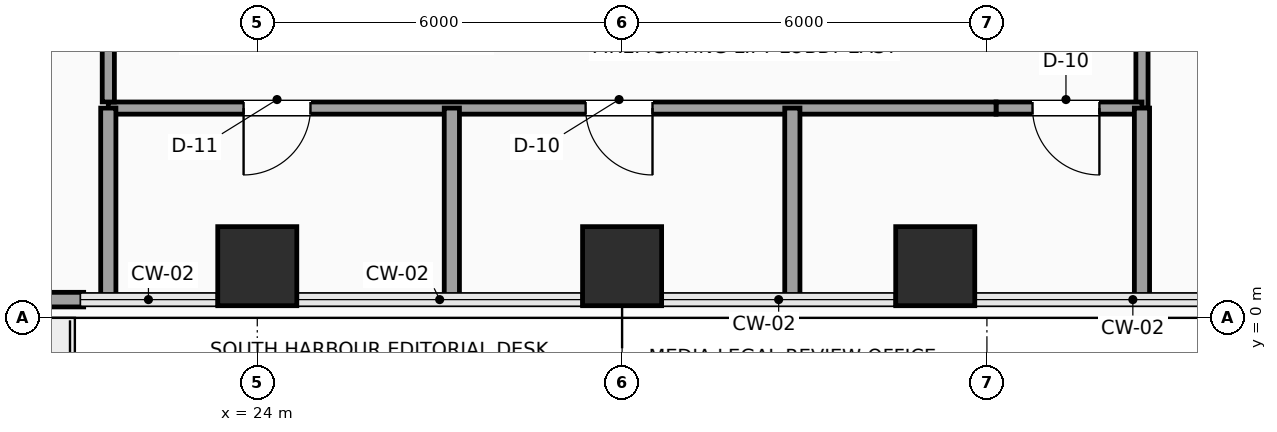
"""IFC4 building model, lengths in metres.
Left out: names, types, materials, properties, quantities, classifications, styles, units other than length and angle.
Written with IfcOpenShell. Run it as: python <this file> out.ifc"""

import sys

from ifc_helpers import new_model, si_unit, direction, frame, frame_2d, origin, origin_2d, place, context, subcontext, project, spatial, rectangle, extrude, element, fill, save


model = new_model("IFC4")
c1 = context("Model", 3, precision=1e-05, world=origin(), true_north=direction((0.0, 1.0)))
c2 = subcontext(c1, "Body", "Model", "MODEL_VIEW")
j1 = project(units=[si_unit("LENGTHUNIT", "METRE"), si_unit("PLANEANGLEUNIT", "RADIAN")], contexts=[c1])
p1 = place(None, origin())
s1 = spatial("IfcSite", under=j1, at=p1, CompositionType="ELEMENT")
p2 = place(p1, origin())
s2 = spatial("IfcBuilding", under=s1, at=p2, CompositionType="ELEMENT")
p3 = place(p2, frame((0.0, 0.0, 79.2)))
s3 = spatial("IfcBuildingStorey", under=s2, at=p3, CompositionType="ELEMENT", Elevation=79.2)
for number, where, z_axis, x_axis in (
    (1, (24.0, 0.85, 0.0), (0.0, 0.0, 1.0), (1.0, 0.0, 0.0)),
    (2, (30.0, 0.85, 0.0), (0.0, 0.0, 1.0), (1.0, 0.0, 0.0)),
    (3, (35.15, 0.85, 0.0), (0.0, 0.0, 1.0), (1.0, 0.0, 0.0)),
):
    element("IfcColumn", number, at=place(p3, frame(where, z_axis=z_axis, x_axis=x_axis)), inside=s3, PredefinedType="COLUMN", context=c2, shape_type="SweptSolid", body=[
        extrude(rectangle(XDim=1.3, YDim=1.3, at=origin_2d()), origin(), (0.0, 0.0, 1.0), 3.9),
    ])
p4 = place(p3, frame((21.145, 0.3, 0.0), z_axis=(0.0, 0.0, 1.0), x_axis=(-1.0, 0.0, 0.0)))
e4 = element("IfcWall", 4, at=p4, inside=s3, PredefinedType="SOLIDWALL", context=c2, shape_type="SweptSolid", body=[
    extrude(rectangle(XDim=9.29, YDim=0.24, at=frame_2d((4.645, 0.0))), origin(), (0.0, 0.0, 1.0), 3.65),
])
p5 = place(p4, frame((3.945, 0.0, 0.0)))
e5 = element("IfcOpeningElement", 5, at=p5, cuts=e4, PredefinedType="OPENING", context=c2, shape_type="SweptSolid", body=[
    extrude(rectangle(XDim=1.05, YDim=2.2, at=frame_2d((0.525, 1.1))), frame((0.0, 0.13, 0.0), z_axis=(0.0, -1.0, 0.0), x_axis=(1.0, 0.0, 0.0)), (0.0, 0.0, 1.0), 0.26),
])
p6 = place(p3, frame((38.55, 5.8, 0.0), z_axis=(0.0, 0.0, 1.0), x_axis=(0.0, -1.0, 0.0)))
e6 = element("IfcWall", 6, at=p6, inside=s3, PredefinedType="PARTITIONING", context=c2, shape_type="SweptSolid", body=[
    extrude(rectangle(XDim=2.35, YDim=0.2, at=frame_2d((1.175, 0.0))), origin(), (0.0, 0.0, 1.0), 3.65),
])
p7 = place(p3, frame((38.55, 3.45, 0.0), z_axis=(0.0, 0.0, 1.0), x_axis=(-1.0, 0.0, 0.0)))
e7 = element("IfcWall", 7, at=p7, inside=s3, PredefinedType="PARTITIONING", context=c2, shape_type="SweptSolid", body=[
    extrude(rectangle(XDim=2.4, YDim=0.2, at=frame_2d((1.2, 0.0))), origin(), (0.0, 0.0, 1.0), 3.142),
])
p8 = place(p7, frame((0.7, 0.0, 0.0)))
e8 = element("IfcOpeningElement", 8, at=p8, cuts=e7, PredefinedType="OPENING", context=c2, shape_type="SweptSolid", body=[
    extrude(rectangle(XDim=1.1, YDim=2.25, at=frame_2d((0.55, 1.125))), frame((0.0, 0.11, 0.0), z_axis=(0.0, -1.0, 0.0), x_axis=(1.0, 0.0, 0.0)), (0.0, 0.0, 1.0), 0.22),
])
p9 = place(p3, frame((36.15, 3.45, 0.0), z_axis=(0.0, 0.0, 1.0), x_axis=(-1.0, 0.0, 0.0)))
e9 = element("IfcWall", 9, at=p9, inside=s3, PredefinedType="PARTITIONING", context=c2, shape_type="SweptSolid", body=[
    extrude(rectangle(XDim=14.6, YDim=0.2, at=frame_2d((7.3, 0.0))), origin(), (0.0, 0.0, 1.0), 3.142),
])
p10 = place(p9, frame((11.275, 0.0, 0.0)))
e10 = element("IfcOpeningElement", 10, at=p10, cuts=e9, PredefinedType="OPENING", context=c2, shape_type="SweptSolid", body=[
    extrude(rectangle(XDim=1.1, YDim=2.25, at=frame_2d((0.55, 1.125))), frame((0.0, 0.11, 0.0), z_axis=(0.0, -1.0, 0.0), x_axis=(1.0, 0.0, 0.0)), (0.0, 0.0, 1.0), 0.22),
])
p11 = place(p9, frame((5.65, 0.0, 0.0)))
e11 = element("IfcOpeningElement", 11, at=p11, cuts=e9, PredefinedType="OPENING", context=c2, shape_type="SweptSolid", body=[
    extrude(rectangle(XDim=1.1, YDim=2.25, at=frame_2d((0.55, 1.125))), frame((0.0, 0.11, 0.0), z_axis=(0.0, -1.0, 0.0), x_axis=(1.0, 0.0, 0.0)), (0.0, 0.0, 1.0), 0.22),
])
p12 = place(p3, frame((21.55, 3.55, 0.0), z_axis=(0.0, 0.0, 1.0), x_axis=(0.0, 1.0, 0.0)))
e12 = element("IfcWall", 12, at=p12, inside=s3, PredefinedType="PARTITIONING", context=c2, shape_type="SweptSolid", body=[
    extrude(rectangle(XDim=2.25, YDim=0.2, at=frame_2d((1.125, 0.0))), origin(), (0.0, 0.0, 1.0), 3.65),
])
for number, where, z_axis, x_axis in (
    (13, (21.55, 0.3, 0.0), (0.0, 0.0, 1.0), (0.0, 1.0, 0.0)),
    (14, (27.2, 0.3, 0.0), (0.0, 0.0, 1.0), (0.0, 1.0, 0.0)),
    (15, (32.8, 0.3, 0.0), (0.0, 0.0, 1.0), (0.0, 1.0, 0.0)),
    (16, (38.55, 0.3, 0.0), (0.0, 0.0, 1.0), (0.0, 1.0, 0.0)),
):
    element("IfcWall", number, at=place(p3, frame(where, z_axis=z_axis, x_axis=x_axis)), inside=s3, PredefinedType="PARTITIONING", context=c2, shape_type="SweptSolid", body=[
        extrude(rectangle(XDim=3.15, YDim=0.25, at=frame_2d((1.575, 0.0))), origin(), (0.0, 0.0, 1.0), 3.65),
    ])
p13 = place(p8, origin())
e17 = element("IfcDoor", 17, at=p13, inside=s3, OperationType="SINGLE_SWING_LEFT", PredefinedType="DOOR", context=c2, shape_type="SweptSolid", body=[
    extrude(rectangle(XDim=1.1, YDim=2.25, at=frame_2d((0.55, 1.125))), frame((0.0, 0.025, 0.0), z_axis=(0.0, -1.0, 0.0), x_axis=(1.0, 0.0, 0.0)), (0.0, 0.0, 1.0), 0.05),
])
fill(e8, e17)
p14 = place(p10, origin())
e18 = element("IfcDoor", 18, at=p14, inside=s3, OperationType="SINGLE_SWING_RIGHT", PredefinedType="DOOR", context=c2, shape_type="SweptSolid", body=[
    extrude(rectangle(XDim=1.1, YDim=2.25, at=frame_2d((0.55, 1.125))), frame((0.0, 0.025, 0.0), z_axis=(0.0, -1.0, 0.0), x_axis=(1.0, 0.0, 0.0)), (0.0, 0.0, 1.0), 0.05),
])
fill(e10, e18)
p15 = place(p11, origin())
e19 = element("IfcDoor", 19, at=p15, inside=s3, OperationType="SINGLE_SWING_LEFT", PredefinedType="DOOR", context=c2, shape_type="SweptSolid", body=[
    extrude(rectangle(XDim=1.1, YDim=2.25, at=frame_2d((0.55, 1.125))), frame((0.0, 0.025, 0.0), z_axis=(0.0, -1.0, 0.0), x_axis=(1.0, 0.0, 0.0)), (0.0, 0.0, 1.0), 0.05),
])
fill(e11, e19)
save(model, sys.argv[1])
